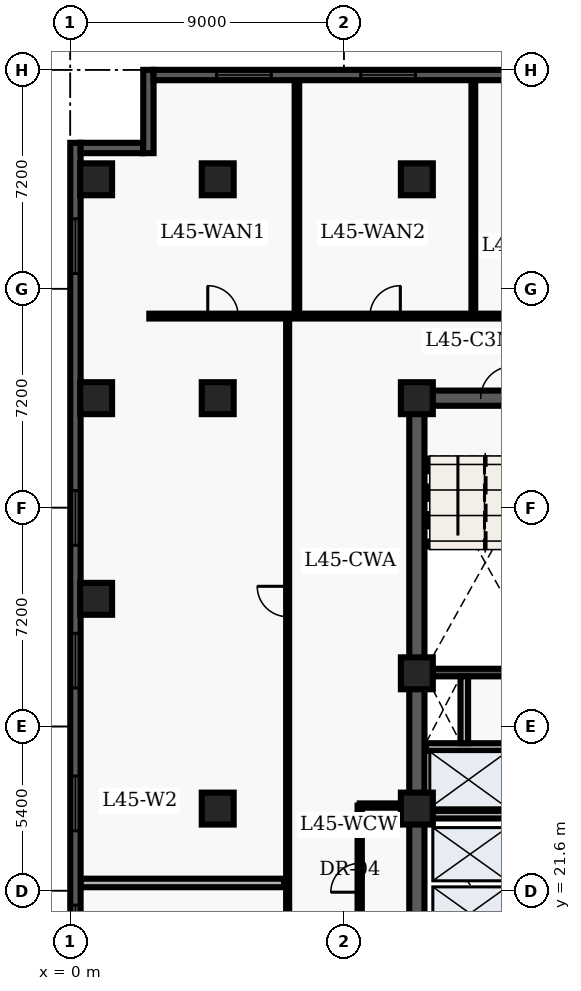
"""IFC4 building model, lengths in metres.
Left out: names, types, materials, properties, quantities, classifications, styles, units other than length and angle.
Written with IfcOpenShell. Run it as: python <this file> out.ifc"""

import sys

from ifc_helpers import new_model, entity, si_unit, converted_unit, direction, frame, origin_with_axes, origin_2d_with_axis, place, context, subcontext, project, spatial, polyline, rectangle, outline, extrude, element, fill, save


model = new_model("IFC4")
c1 = context("Model", 3, precision=1e-05, world=origin_with_axes(), true_north=direction((0.0, 1.0)))
c2 = subcontext(c1, "Body", "Model", "MODEL_VIEW")
j1 = project(units=[si_unit("LENGTHUNIT", "METRE"), converted_unit("PLANEANGLEUNIT", "DEGREE", entity("IfcPlaneAngleMeasure", 0.017), si_unit("PLANEANGLEUNIT", "RADIAN"), dimensions=[0, 0, 0, 0, 0, 0, 0])], contexts=[c1])
p1 = place(None, origin_with_axes())
s1 = spatial("IfcSite", under=j1, at=p1, CompositionType="ELEMENT")
p2 = place(p1, origin_with_axes())
s2 = spatial("IfcBuilding", under=s1, at=p2, CompositionType="ELEMENT")
p3 = place(p2, frame((0.0, 0.0, 183.6), z_axis=(0.0, 0.0, 1.0), x_axis=(1.0, 0.0, 0.0)))
s3 = spatial("IfcBuildingStorey", under=s2, at=p3, CompositionType="ELEMENT", Elevation=183.6)
p4 = place(p3, frame((11.4, 10.8, 0.0), z_axis=(0.0, 0.0, 1.0), x_axis=(0.0, 1.0, 0.0)))
e1 = element("IfcWall", 1, at=p4, inside=s3, PredefinedType="SHEAR", context=c2, shape_type="SweptSolid", body=[
    extrude(outline(polyline([(0.0, -0.25), (27.0, -0.25), (27.0, 0.25), (0.0, 0.25), (0.0, -0.25)])), origin_with_axes(), (0.0, 0.0, 1.0), 3.6),
])
p5 = place(p3, frame((11.4, 37.8, 0.0), z_axis=(0.0, 0.0, 1.0), x_axis=(1.0, 0.0, 0.0)))
e2 = element("IfcWall", 2, at=p5, inside=s3, PredefinedType="SHEAR", context=c2, shape_type="SweptSolid", body=[
    extrude(outline(polyline([(0.0, -0.25), (7.2, -0.25), (7.2, 0.25), (0.0, 0.25), (0.0, -0.25)])), origin_with_axes(), (0.0, 0.0, 1.0), 3.6),
])
p6 = place(p5, frame((2.625, 0.0, 0.0), z_axis=(0.0, 0.0, 1.0), x_axis=(1.0, 0.0, 0.0)))
e3 = element("IfcOpeningElement", 3, at=p6, cuts=e2, PredefinedType="OPENING", context=c2, shape_type="SweptSolid", body=[
    extrude(rectangle(XDim=1.05, YDim=0.52, at=origin_2d_with_axis()), origin_with_axes(), (0.0, 0.0, 1.0), 2.15),
])
p7 = place(p3, frame((11.65, 28.775, 0.0), z_axis=(0.0, 0.0, 1.0), x_axis=(1.0, 0.0, 0.0)))
e4 = element("IfcWall", 4, at=p7, inside=s3, PredefinedType="SHEAR", context=c2, shape_type="SweptSolid", body=[
    extrude(outline(polyline([(0.0, -0.125), (6.7, -0.125), (6.7, 0.125), (0.0, 0.125), (0.0, -0.125)])), origin_with_axes(), (0.0, 0.0, 1.0), 3.6),
])
p8 = place(p3, frame((11.7, 24.1, 0.0), z_axis=(0.0, 0.0, 1.0), x_axis=(1.0, 0.0, 0.0)))
e5 = element("IfcWall", 5, at=p8, inside=s3, PredefinedType="SOLIDWALL", context=c2, shape_type="SweptSolid", body=[
    extrude(outline(polyline([(0.0, -0.125), (6.6, -0.125), (6.6, 0.125), (0.0, 0.125), (0.0, -0.125)])), origin_with_axes(), (0.0, 0.0, 1.0), 2.64),
])
p9 = place(p8, frame((3.75, 0.0, 0.0), z_axis=(0.0, 0.0, 1.0), x_axis=(1.0, 0.0, 0.0)))
e6 = element("IfcOpeningElement", 6, at=p9, cuts=e5, PredefinedType="OPENING", context=c2, shape_type="SweptSolid", body=[
    extrude(rectangle(XDim=0.9, YDim=0.27, at=origin_2d_with_axis()), origin_with_axes(), (0.0, 0.0, 1.0), 2.15),
])
p10 = place(p3, frame((11.7, 26.325, 0.0), z_axis=(0.0, 0.0, 1.0), x_axis=(1.0, 0.0, 0.0)))
e7 = element("IfcWall", 7, at=p10, inside=s3, PredefinedType="SOLIDWALL", context=c2, shape_type="SweptSolid", body=[
    extrude(outline(polyline([(0.0, -0.125), (6.6, -0.125), (6.6, 0.125), (0.0, 0.125), (0.0, -0.125)])), origin_with_axes(), (0.0, 0.0, 1.0), 2.64),
])
p11 = place(p10, frame((3.5, 0.0, 0.0), z_axis=(0.0, 0.0, 1.0), x_axis=(1.0, 0.0, 0.0)))
e8 = element("IfcOpeningElement", 8, at=p11, cuts=e7, PredefinedType="OPENING", context=c2, shape_type="SweptSolid", body=[
    extrude(rectangle(XDim=0.9, YDim=0.27, at=origin_2d_with_axis()), origin_with_axes(), (0.0, 0.0, 1.0), 2.15),
])
p12 = place(p3, frame((12.96, 26.45, 0.0), z_axis=(0.0, 0.0, 1.0), x_axis=(0.0, 1.0, 0.0)))
e9 = element("IfcWall", 9, at=p12, inside=s3, PredefinedType="SOLIDWALL", context=c2, shape_type="SweptSolid", body=[
    extrude(outline(polyline([(0.0, -0.125), (2.2, -0.125), (2.2, 0.125), (0.0, 0.125), (0.0, -0.125)])), origin_with_axes(), (0.0, 0.0, 1.0), 2.64),
])
for number, where, z_axis, x_axis in (
    (10, (11.4, 24.3, 0.0), (0.0, 0.0, 1.0), (1.0, 0.0, 0.0)),
    (11, (11.4, 28.75, 0.0), (0.0, 0.0, 1.0), (1.0, 0.0, 0.0)),
    (12, (11.4, 37.8, 0.0), (0.0, 0.0, 1.0), (1.0, 0.0, 0.0)),
    (13, (11.4, 45.0, 0.0), (0.0, 0.0, 1.0), (1.0, 0.0, 0.0)),
    (14, (4.85, 24.3, 0.0), (0.0, 0.0, 1.0), (1.0, 0.0, 0.0)),
    (15, (4.85, 37.8, 0.0), (0.0, 0.0, 1.0), (1.0, 0.0, 0.0)),
    (16, (4.85, 45.0, 0.0), (0.0, 0.0, 1.0), (1.0, 0.0, 0.0)),
    (17, (0.85, 31.2, 0.0), (0.0, 0.0, 1.0), (1.0, 0.0, 0.0)),
    (18, (0.85, 37.8, 0.0), (0.0, 0.0, 1.0), (1.0, 0.0, 0.0)),
    (19, (0.85, 45.0, 0.0), (0.0, 0.0, 1.0), (1.0, 0.0, 0.0)),
):
    element("IfcColumn", number, at=place(p3, frame(where, z_axis=z_axis, x_axis=x_axis)), inside=s3, PredefinedType="COLUMN", context=c2, shape_type="SweptSolid", body=[
        extrude(rectangle(XDim=1.05, YDim=1.05, at=origin_2d_with_axis()), origin_with_axes(), (0.0, 0.0, 1.0), 3.9),
    ])
p13 = place(p3, frame((9.52, 20.4, 0.0), z_axis=(0.0, 0.0, 1.0), x_axis=(0.0, 1.0, 0.0)))
e20 = element("IfcWall", 20, at=p13, inside=s3, PredefinedType="PARTITIONING", context=c2, shape_type="SweptSolid", body=[
    extrude(outline(polyline([(0.0, -0.07), (4.0, -0.07), (4.0, 0.07), (0.0, 0.07), (0.0, -0.07)])), origin_with_axes(), (0.0, 0.0, 1.0), 2.64),
])
p14 = place(p13, frame((1.625, 0.0, 0.0), z_axis=(0.0, 0.0, 1.0), x_axis=(1.0, 0.0, 0.0)))
e21 = element("IfcOpeningElement", 21, at=p14, cuts=e20, PredefinedType="OPENING", context=c2, shape_type="SweptSolid", body=[
    extrude(rectangle(XDim=0.95, YDim=0.16, at=origin_2d_with_axis()), origin_with_axes(), (0.0, 0.0, 1.0), 2.15),
])
p15 = place(p3, frame((9.52, 24.4, 0.0), z_axis=(0.0, 0.0, 1.0), x_axis=(1.0, 0.0, 0.0)))
e22 = element("IfcWall", 22, at=p15, inside=s3, PredefinedType="PARTITIONING", context=c2, shape_type="SweptSolid", body=[
    extrude(outline(polyline([(0.0, -0.07), (1.58, -0.07), (1.58, 0.07), (0.0, 0.07), (0.0, -0.07)])), origin_with_axes(), (0.0, 0.0, 1.0), 2.64),
])
p16 = place(p3, frame((2.6, 40.5, 0.0), z_axis=(0.0, 0.0, 1.0), x_axis=(1.0, 0.0, 0.0)))
e23 = element("IfcWall", 23, at=p16, inside=s3, PredefinedType="PARTITIONING", context=c2, shape_type="SweptSolid", body=[
    extrude(outline(polyline([(0.0, -0.08), (23.459, -0.08), (23.459, 0.08), (0.0, 0.08), (0.0, -0.08)])), origin_with_axes(), (0.0, 0.0, 1.0), 2.64),
])
p17 = place(p16, frame((2.422, 0.0, 0.0), z_axis=(0.0, 0.0, 1.0), x_axis=(1.0, 0.0, 0.0)))
e24 = element("IfcOpeningElement", 24, at=p17, cuts=e23, PredefinedType="OPENING", context=c2, shape_type="SweptSolid", body=[
    extrude(rectangle(XDim=1.0, YDim=0.18, at=origin_2d_with_axis()), origin_with_axes(), (0.0, 0.0, 1.0), 2.15),
])
p18 = place(p16, frame((7.756, 0.0, 0.0), z_axis=(0.0, 0.0, 1.0), x_axis=(1.0, 0.0, 0.0)))
e25 = element("IfcOpeningElement", 25, at=p18, cuts=e23, PredefinedType="OPENING", context=c2, shape_type="SweptSolid", body=[
    extrude(rectangle(XDim=1.0, YDim=0.18, at=origin_2d_with_axis()), origin_with_axes(), (0.0, 0.0, 1.0), 2.15),
])
p19 = place(p16, frame((14.089, 0.0, 0.0), z_axis=(0.0, 0.0, 1.0), x_axis=(1.0, 0.0, 0.0)))
e26 = element("IfcOpeningElement", 26, at=p19, cuts=e23, PredefinedType="OPENING", context=c2, shape_type="SweptSolid", body=[
    extrude(rectangle(XDim=1.2, YDim=0.18, at=origin_2d_with_axis()), origin_with_axes(), (0.0, 0.0, 1.0), 2.2),
])
p20 = place(p3, frame((7.15, 7.8, 0.0), z_axis=(0.0, 0.0, 1.0), x_axis=(0.0, 1.0, 0.0)))
e27 = element("IfcWall", 27, at=p20, inside=s3, PredefinedType="PARTITIONING", context=c2, shape_type="SweptSolid", body=[
    extrude(outline(polyline([(0.0, -0.05), (32.7, -0.05), (32.7, 0.05), (0.0, 0.05), (0.0, -0.05)])), origin_with_axes(), (0.0, 0.0, 1.0), 2.64),
])
p21 = place(p20, frame((7.092, 0.0, 0.0), z_axis=(0.0, 0.0, 1.0), x_axis=(1.0, 0.0, 0.0)))
e28 = element("IfcOpeningElement", 28, at=p21, cuts=e27, PredefinedType="OPENING", context=c2, shape_type="SweptSolid", body=[
    extrude(rectangle(XDim=1.0, YDim=0.12, at=origin_2d_with_axis()), origin_with_axes(), (0.0, 0.0, 1.0), 2.15),
])
p22 = place(p20, frame((23.312, 0.0, 0.0), z_axis=(0.0, 0.0, 1.0), x_axis=(1.0, 0.0, 0.0)))
e29 = element("IfcOpeningElement", 29, at=p22, cuts=e27, PredefinedType="OPENING", context=c2, shape_type="SweptSolid", body=[
    extrude(rectangle(XDim=1.0, YDim=0.12, at=origin_2d_with_axis()), origin_with_axes(), (0.0, 0.0, 1.0), 2.15),
])
p23 = place(p3, frame((0.335, 21.854, 0.0), z_axis=(0.0, 0.0, 1.0), x_axis=(1.0, 0.0, 0.0)))
e30 = element("IfcWall", 30, at=p23, inside=s3, PredefinedType="PARTITIONING", context=c2, shape_type="SweptSolid", body=[
    extrude(outline(polyline([(0.0, -0.14), (6.695, -0.14), (6.695, 0.14), (0.0, 0.14), (0.0, -0.14)])), origin_with_axes(), (0.0, 0.0, 1.0), 2.64),
])
p24 = place(p3, frame((7.455, 40.6, 0.0), z_axis=(0.0, 0.0, 1.0), x_axis=(0.0, 1.0, 0.0)))
e31 = element("IfcWall", 31, at=p24, inside=s3, PredefinedType="PARTITIONING", context=c2, shape_type="SweptSolid", body=[
    extrude(outline(polyline([(0.0, -0.075), (7.665, -0.075), (7.665, 0.075), (0.0, 0.075), (0.0, -0.075)])), origin_with_axes(), (0.0, 0.0, 1.0), 2.64),
])
p25 = place(p3, frame((13.258, 40.6, 0.0), z_axis=(0.0, 0.0, 1.0), x_axis=(0.0, 1.0, 0.0)))
e32 = element("IfcWall", 32, at=p25, inside=s3, PredefinedType="PARTITIONING", context=c2, shape_type="SweptSolid", body=[
    extrude(outline(polyline([(0.0, -0.062), (7.665, -0.062), (7.665, 0.062), (0.0, 0.062), (0.0, -0.062)])), origin_with_axes(), (0.0, 0.0, 1.0), 2.64),
])
p26 = place(p3, frame((0.17, 2.74, 0.0), z_axis=(0.0, 0.0, 1.0), x_axis=(0.0, 1.0, 0.0)))
e33 = element("IfcWall", 33, at=p26, inside=s3, PredefinedType="SOLIDWALL", context=c2, shape_type="SweptSolid", body=[
    extrude(outline(polyline([(0.0, -0.17), (43.46, -0.17), (43.46, 0.17), (0.0, 0.17), (0.0, -0.17)])), origin_with_axes(), (0.0, 0.0, 1.0), 3.6),
])
p27 = place(p26, frame((2.948, 0.0, 0.45), z_axis=(0.0, 0.0, 1.0), x_axis=(1.0, 0.0, 0.0)))
e34 = element("IfcOpeningElement", 34, at=p27, cuts=e33, PredefinedType="OPENING", context=c2, shape_type="SweptSolid", body=[
    extrude(rectangle(XDim=1.8, YDim=0.36, at=origin_2d_with_axis()), origin_with_axes(), (0.0, 0.0, 1.0), 2.1),
])
p28 = place(p26, frame((12.339, 0.0, 0.45), z_axis=(0.0, 0.0, 1.0), x_axis=(1.0, 0.0, 0.0)))
e35 = element("IfcOpeningElement", 35, at=p28, cuts=e33, PredefinedType="OPENING", context=c2, shape_type="SweptSolid", body=[
    extrude(rectangle(XDim=1.8, YDim=0.36, at=origin_2d_with_axis()), origin_with_axes(), (0.0, 0.0, 1.0), 2.1),
])
p29 = place(p26, frame((17.484, 0.0, 0.45), z_axis=(0.0, 0.0, 1.0), x_axis=(1.0, 0.0, 0.0)))
e36 = element("IfcOpeningElement", 36, at=p29, cuts=e33, PredefinedType="OPENING", context=c2, shape_type="SweptSolid", body=[
    extrude(rectangle(XDim=1.8, YDim=0.36, at=origin_2d_with_axis()), origin_with_axes(), (0.0, 0.0, 1.0), 2.1),
])
p30 = place(p26, frame((21.73, 0.0, 0.45), z_axis=(0.0, 0.0, 1.0), x_axis=(1.0, 0.0, 0.0)))
e37 = element("IfcOpeningElement", 37, at=p30, cuts=e33, PredefinedType="OPENING", context=c2, shape_type="SweptSolid", body=[
    extrude(rectangle(XDim=1.8, YDim=0.36, at=origin_2d_with_axis()), origin_with_axes(), (0.0, 0.0, 1.0), 2.1),
])
p31 = place(p26, frame((26.426, 0.0, 0.45), z_axis=(0.0, 0.0, 1.0), x_axis=(1.0, 0.0, 0.0)))
e38 = element("IfcOpeningElement", 38, at=p31, cuts=e33, PredefinedType="OPENING", context=c2, shape_type="SweptSolid", body=[
    extrude(rectangle(XDim=1.8, YDim=0.36, at=origin_2d_with_axis()), origin_with_axes(), (0.0, 0.0, 1.0), 2.1),
])
p32 = place(p26, frame((31.121, 0.0, 0.45), z_axis=(0.0, 0.0, 1.0), x_axis=(1.0, 0.0, 0.0)))
e39 = element("IfcOpeningElement", 39, at=p32, cuts=e33, PredefinedType="OPENING", context=c2, shape_type="SweptSolid", body=[
    extrude(rectangle(XDim=1.8, YDim=0.36, at=origin_2d_with_axis()), origin_with_axes(), (0.0, 0.0, 1.0), 2.1),
])
p33 = place(p26, frame((40.062, 0.0, 0.45), z_axis=(0.0, 0.0, 1.0), x_axis=(1.0, 0.0, 0.0)))
e40 = element("IfcOpeningElement", 40, at=p33, cuts=e33, PredefinedType="OPENING", context=c2, shape_type="SweptSolid", body=[
    extrude(rectangle(XDim=1.8, YDim=0.36, at=origin_2d_with_axis()), origin_with_axes(), (0.0, 0.0, 1.0), 2.1),
])
p34 = place(p3, frame((0.34, 46.03, 0.0), z_axis=(0.0, 0.0, 1.0), x_axis=(1.0, 0.0, 0.0)))
e41 = element("IfcWall", 41, at=p34, inside=s3, PredefinedType="SOLIDWALL", context=c2, shape_type="SweptSolid", body=[
    extrude(outline(polyline([(0.0, -0.17), (2.06, -0.17), (2.06, 0.17), (0.0, 0.17), (0.0, -0.17)])), origin_with_axes(), (0.0, 0.0, 1.0), 3.6),
])
p35 = place(p3, frame((2.57, 45.86, 0.0), z_axis=(0.0, 0.0, 1.0), x_axis=(0.0, 1.0, 0.0)))
e42 = element("IfcWall", 42, at=p35, inside=s3, PredefinedType="SOLIDWALL", context=c2, shape_type="SweptSolid", body=[
    extrude(outline(polyline([(0.0, -0.17), (2.74, -0.17), (2.74, 0.17), (0.0, 0.17), (0.0, -0.17)])), origin_with_axes(), (0.0, 0.0, 1.0), 3.6),
])
p36 = place(p3, frame((2.74, 48.43, 0.0), z_axis=(0.0, 0.0, 1.0), x_axis=(1.0, 0.0, 0.0)))
e43 = element("IfcWall", 43, at=p36, inside=s3, PredefinedType="SOLIDWALL", context=c2, shape_type="SweptSolid", body=[
    extrude(outline(polyline([(0.0, -0.17), (20.174, -0.17), (20.174, 0.17), (0.0, 0.17), (0.0, -0.17)])), origin_with_axes(), (0.0, 0.0, 1.0), 3.6),
])
p37 = place(p36, frame((2.972, 0.0, 0.45), z_axis=(0.0, 0.0, 1.0), x_axis=(1.0, 0.0, 0.0)))
e44 = element("IfcOpeningElement", 44, at=p37, cuts=e43, PredefinedType="OPENING", context=c2, shape_type="SweptSolid", body=[
    extrude(rectangle(XDim=1.8, YDim=0.36, at=origin_2d_with_axis()), origin_with_axes(), (0.0, 0.0, 1.0), 2.1),
])
p38 = place(p36, frame((7.715, 0.0, 0.45), z_axis=(0.0, 0.0, 1.0), x_axis=(1.0, 0.0, 0.0)))
e45 = element("IfcOpeningElement", 45, at=p38, cuts=e43, PredefinedType="OPENING", context=c2, shape_type="SweptSolid", body=[
    extrude(rectangle(XDim=1.8, YDim=0.36, at=origin_2d_with_axis()), origin_with_axes(), (0.0, 0.0, 1.0), 2.1),
])
p39 = place(p36, frame((12.459, 0.0, 0.45), z_axis=(0.0, 0.0, 1.0), x_axis=(1.0, 0.0, 0.0)))
e46 = element("IfcOpeningElement", 46, at=p39, cuts=e43, PredefinedType="OPENING", context=c2, shape_type="SweptSolid", body=[
    extrude(rectangle(XDim=1.8, YDim=0.36, at=origin_2d_with_axis()), origin_with_axes(), (0.0, 0.0, 1.0), 2.1),
])
p40 = place(p36, frame((17.202, 0.0, 0.45), z_axis=(0.0, 0.0, 1.0), x_axis=(1.0, 0.0, 0.0)))
e47 = element("IfcOpeningElement", 47, at=p40, cuts=e43, PredefinedType="OPENING", context=c2, shape_type="SweptSolid", body=[
    extrude(rectangle(XDim=1.8, YDim=0.36, at=origin_2d_with_axis()), origin_with_axes(), (0.0, 0.0, 1.0), 2.1),
])
p41 = place(p5, frame((2.625, 0.0, 0.0), z_axis=(0.0, 0.0, 1.0), x_axis=(1.0, 0.0, 0.0)))
e48 = element("IfcDoor", 48, at=p41, inside=s3, OperationType="SINGLE_SWING_RIGHT", PredefinedType="DOOR", context=c2, shape_type="SweptSolid", body=[
    extrude(rectangle(XDim=1.05, YDim=0.09, at=origin_2d_with_axis()), origin_with_axes(), (0.0, 0.0, 1.0), 2.15),
])
fill(e3, e48)
p42 = place(p13, frame((1.625, 0.0, 0.0), z_axis=(0.0, 0.0, 1.0), x_axis=(1.0, 0.0, 0.0)))
e49 = element("IfcDoor", 49, at=p42, inside=s3, OperationType="SINGLE_SWING_LEFT", PredefinedType="DOOR", context=c2, shape_type="SweptSolid", body=[
    extrude(rectangle(XDim=0.95, YDim=0.084, at=origin_2d_with_axis()), origin_with_axes(), (0.0, 0.0, 1.0), 2.15),
])
fill(e21, e49)
p43 = place(p20, frame((23.312, 0.0, 0.0), z_axis=(0.0, 0.0, 1.0), x_axis=(1.0, 0.0, 0.0)))
e50 = element("IfcDoor", 50, at=p43, inside=s3, OperationType="SINGLE_SWING_RIGHT", PredefinedType="DOOR", context=c2, shape_type="SweptSolid", body=[
    extrude(rectangle(XDim=1.0, YDim=0.06, at=origin_2d_with_axis()), origin_with_axes(), (0.0, 0.0, 1.0), 2.15),
])
fill(e29, e50)
p44 = place(p16, frame((2.422, 0.0, 0.0), z_axis=(0.0, 0.0, 1.0), x_axis=(1.0, 0.0, 0.0)))
e51 = element("IfcDoor", 51, at=p44, inside=s3, OperationType="SINGLE_SWING_LEFT", PredefinedType="DOOR", context=c2, shape_type="SweptSolid", body=[
    extrude(rectangle(XDim=1.0, YDim=0.09, at=origin_2d_with_axis()), origin_with_axes(), (0.0, 0.0, 1.0), 2.15),
])
fill(e24, e51)
p45 = place(p16, frame((7.756, 0.0, 0.0), z_axis=(0.0, 0.0, 1.0), x_axis=(1.0, 0.0, 0.0)))
e52 = element("IfcDoor", 52, at=p45, inside=s3, OperationType="SINGLE_SWING_RIGHT", PredefinedType="DOOR", context=c2, shape_type="SweptSolid", body=[
    extrude(rectangle(XDim=1.0, YDim=0.09, at=origin_2d_with_axis()), origin_with_axes(), (0.0, 0.0, 1.0), 2.15),
])
fill(e25, e52)
p46 = place(p26, frame((17.484, 0.0, 0.45), z_axis=(0.0, 0.0, 1.0), x_axis=(1.0, 0.0, 0.0)))
e53 = element("IfcWindow", 53, at=p46, inside=s3, PredefinedType="WINDOW", context=c2, shape_type="SweptSolid", body=[
    extrude(rectangle(XDim=1.8, YDim=0.09, at=origin_2d_with_axis()), origin_with_axes(), (0.0, 0.0, 1.0), 2.1),
])
fill(e36, e53)
p47 = place(p26, frame((21.73, 0.0, 0.45), z_axis=(0.0, 0.0, 1.0), x_axis=(1.0, 0.0, 0.0)))
e54 = element("IfcWindow", 54, at=p47, inside=s3, PredefinedType="WINDOW", context=c2, shape_type="SweptSolid", body=[
    extrude(rectangle(XDim=1.8, YDim=0.09, at=origin_2d_with_axis()), origin_with_axes(), (0.0, 0.0, 1.0), 2.1),
])
fill(e37, e54)
p48 = place(p26, frame((26.426, 0.0, 0.45), z_axis=(0.0, 0.0, 1.0), x_axis=(1.0, 0.0, 0.0)))
e55 = element("IfcWindow", 55, at=p48, inside=s3, PredefinedType="WINDOW", context=c2, shape_type="SweptSolid", body=[
    extrude(rectangle(XDim=1.8, YDim=0.09, at=origin_2d_with_axis()), origin_with_axes(), (0.0, 0.0, 1.0), 2.1),
])
fill(e38, e55)
p49 = place(p26, frame((31.121, 0.0, 0.45), z_axis=(0.0, 0.0, 1.0), x_axis=(1.0, 0.0, 0.0)))
e56 = element("IfcWindow", 56, at=p49, inside=s3, PredefinedType="WINDOW", context=c2, shape_type="SweptSolid", body=[
    extrude(rectangle(XDim=1.8, YDim=0.09, at=origin_2d_with_axis()), origin_with_axes(), (0.0, 0.0, 1.0), 2.1),
])
fill(e39, e56)
p50 = place(p26, frame((40.062, 0.0, 0.45), z_axis=(0.0, 0.0, 1.0), x_axis=(1.0, 0.0, 0.0)))
e57 = element("IfcWindow", 57, at=p50, inside=s3, PredefinedType="WINDOW", context=c2, shape_type="SweptSolid", body=[
    extrude(rectangle(XDim=1.8, YDim=0.09, at=origin_2d_with_axis()), origin_with_axes(), (0.0, 0.0, 1.0), 2.1),
])
fill(e40, e57)
p51 = place(p36, frame((2.972, 0.0, 0.45), z_axis=(0.0, 0.0, 1.0), x_axis=(1.0, 0.0, 0.0)))
e58 = element("IfcWindow", 58, at=p51, inside=s3, PredefinedType="WINDOW", context=c2, shape_type="SweptSolid", body=[
    extrude(rectangle(XDim=1.8, YDim=0.09, at=origin_2d_with_axis()), origin_with_axes(), (0.0, 0.0, 1.0), 2.1),
])
fill(e44, e58)
p52 = place(p36, frame((7.715, 0.0, 0.45), z_axis=(0.0, 0.0, 1.0), x_axis=(1.0, 0.0, 0.0)))
e59 = element("IfcWindow", 59, at=p52, inside=s3, PredefinedType="WINDOW", context=c2, shape_type="SweptSolid", body=[
    extrude(rectangle(XDim=1.8, YDim=0.09, at=origin_2d_with_axis()), origin_with_axes(), (0.0, 0.0, 1.0), 2.1),
])
fill(e45, e59)
save(model, sys.argv[1])
